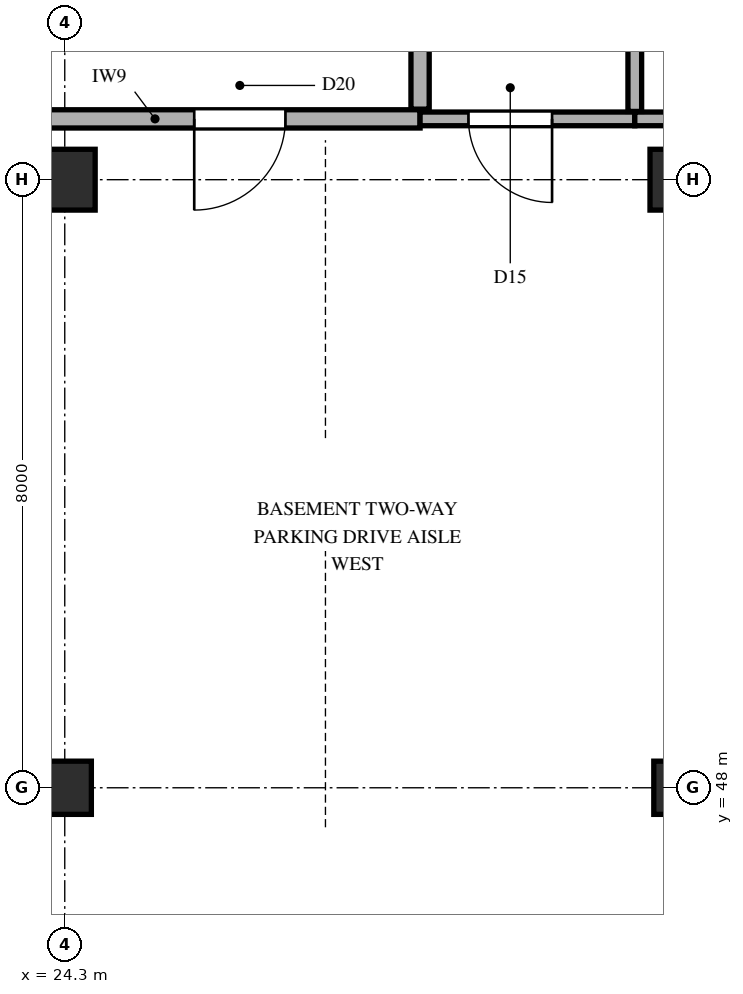
"""IFC4 building model, lengths in metres.
Left out: names, types, materials, properties, quantities, classifications, styles, units other than length and angle.
Written with IfcOpenShell. Run it as: python <this file> out.ifc"""

import sys

from ifc_helpers import new_model, si_unit, direction, frame, frame_2d, origin, origin_2d, place, context, subcontext, project, spatial, rectangle, extrude, element, fill, save


model = new_model("IFC4")
c1 = context("Model", 3, precision=1e-05, world=origin(), true_north=direction((0.0, 1.0)))
c2 = subcontext(c1, "Body", "Model", "MODEL_VIEW")
j1 = project(units=[si_unit("LENGTHUNIT", "METRE"), si_unit("PLANEANGLEUNIT", "RADIAN")], contexts=[c1])
p1 = place(None, origin())
s1 = spatial("IfcSite", under=j1, at=p1, CompositionType="ELEMENT")
p2 = place(p1, origin())
s2 = spatial("IfcBuilding", under=s1, at=p2, CompositionType="ELEMENT")
p3 = place(p2, frame((0.0, 0.0, -4.8)))
s3 = spatial("IfcBuildingStorey", under=s2, at=p3, CompositionType="ELEMENT", Elevation=-4.8)
p4 = place(p3, frame((24.3, 48.0, 0.0), z_axis=(0.0, 0.0, 1.0), x_axis=(1.0, 0.0, 0.0)))
e1 = element("IfcColumn", 1, at=p4, inside=s3, PredefinedType="COLUMN", context=c2, shape_type="SweptSolid", body=[
    extrude(rectangle(XDim=0.7, YDim=0.7, at=origin_2d()), origin(), (0.0, 0.0, 1.0), 4.8),
])
p5 = place(p3, frame((24.3, 56.0, 0.0), z_axis=(0.0, 0.0, 1.0), x_axis=(1.0, 0.0, 0.0)))
e2 = element("IfcColumn", 2, at=p5, inside=s3, PredefinedType="COLUMN", context=c2, shape_type="SweptSolid", body=[
    extrude(rectangle(XDim=0.8, YDim=0.8, at=origin_2d()), origin(), (0.0, 0.0, 1.0), 4.8),
])
p6 = place(p3, frame((32.4, 48.0, 0.0), z_axis=(0.0, 0.0, 1.0), x_axis=(1.0, 0.0, 0.0)))
e3 = element("IfcColumn", 3, at=p6, inside=s3, PredefinedType="COLUMN", context=c2, shape_type="SweptSolid", body=[
    extrude(rectangle(XDim=0.7, YDim=0.7, at=origin_2d()), origin(), (0.0, 0.0, 1.0), 4.8),
])
p7 = place(p3, frame((32.4, 56.0, 0.0), z_axis=(0.0, 0.0, 1.0), x_axis=(1.0, 0.0, 0.0)))
e4 = element("IfcColumn", 4, at=p7, inside=s3, PredefinedType="COLUMN", context=c2, shape_type="SweptSolid", body=[
    extrude(rectangle(XDim=0.8, YDim=0.8, at=origin_2d()), origin(), (0.0, 0.0, 1.0), 4.8),
])
p8 = place(p3, frame((22.0, 56.8, 0.0), z_axis=(0.0, 0.0, 1.0), x_axis=(1.0, 0.0, 0.0)))
e5 = element("IfcWall", 5, at=p8, inside=s3, PredefinedType="PARTITIONING", context=c2, shape_type="SweptSolid", body=[
    extrude(rectangle(XDim=6.975, YDim=0.24, at=frame_2d((3.488, 0.0))), origin(), (0.0, 0.0, 1.0), 4.45),
])
p9 = place(p8, frame((4.003, 0.0, 0.0)))
e6 = element("IfcOpeningElement", 6, at=p9, cuts=e5, PredefinedType="OPENING", context=c2, shape_type="SweptSolid", body=[
    extrude(rectangle(XDim=1.2, YDim=2.3, at=frame_2d((0.6, 1.15))), frame((0.0, 0.13, 0.0), z_axis=(0.0, -1.0, 0.0), x_axis=(1.0, 0.0, 0.0)), (0.0, 0.0, 1.0), 0.26),
])
p10 = place(p3, frame((28.975, 56.8, 0.0), z_axis=(0.0, 0.0, 1.0), x_axis=(1.0, 0.0, 0.0)))
e7 = element("IfcWall", 7, at=p10, inside=s3, PredefinedType="PARTITIONING", context=c2, shape_type="SweptSolid", body=[
    extrude(rectangle(XDim=2.825, YDim=0.18, at=frame_2d((1.413, 0.0))), origin(), (0.0, 0.0, 1.0), 4.45),
])
p11 = place(p10, frame((0.636, 0.0, 0.0)))
e8 = element("IfcOpeningElement", 8, at=p11, cuts=e7, PredefinedType="OPENING", context=c2, shape_type="SweptSolid", body=[
    extrude(rectangle(XDim=1.1, YDim=2.2, at=frame_2d((0.55, 1.1))), frame((0.0, 0.1, 0.0), z_axis=(0.0, -1.0, 0.0), x_axis=(1.0, 0.0, 0.0)), (0.0, 0.0, 1.0), 0.2),
])
p12 = place(p3, frame((31.8, 56.8, 0.0), z_axis=(0.0, 0.0, 1.0), x_axis=(1.0, 0.0, 0.0)))
e9 = element("IfcWall", 9, at=p12, inside=s3, PredefinedType="PARTITIONING", context=c2, shape_type="SweptSolid", body=[
    extrude(rectangle(XDim=4.4, YDim=0.18, at=frame_2d((2.2, 0.0))), origin(), (0.0, 0.0, 1.0), 4.45),
])
p13 = place(p3, frame((28.975, 56.928, 0.0), z_axis=(0.0, 0.0, 1.0), x_axis=(0.0, 1.0, 0.0)))
e10 = element("IfcWall", 10, at=p13, inside=s3, PredefinedType="PARTITIONING", context=c2, shape_type="SweptSolid", body=[
    extrude(rectangle(XDim=3.164, YDim=0.24, at=frame_2d((1.582, 0.0))), origin(), (0.0, 0.0, 1.0), 4.45),
])
p14 = place(p3, frame((31.8, 56.898, 0.0), z_axis=(0.0, 0.0, 1.0), x_axis=(0.0, 1.0, 0.0)))
e11 = element("IfcWall", 11, at=p14, inside=s3, PredefinedType="PARTITIONING", context=c2, shape_type="SweptSolid", body=[
    extrude(rectangle(XDim=3.194, YDim=0.18, at=frame_2d((1.597, 0.0))), origin(), (0.0, 0.0, 1.0), 4.45),
])
p15 = place(p9, frame((1.2, 0.0, 0.0), z_axis=(0.0, 0.0, 1.0), x_axis=(-1.0, 0.0, 0.0)))
e12 = element("IfcDoor", 12, at=p15, inside=s3, OperationType="SINGLE_SWING_LEFT", PredefinedType="DOOR", context=c2, shape_type="SweptSolid", body=[
    extrude(rectangle(XDim=1.2, YDim=2.3, at=frame_2d((0.6, 1.15))), frame((0.0, 0.025, 0.0), z_axis=(0.0, -1.0, 0.0), x_axis=(1.0, 0.0, 0.0)), (0.0, 0.0, 1.0), 0.05),
])
fill(e6, e12)
p16 = place(p11, frame((1.1, 0.0, 0.0), z_axis=(0.0, 0.0, 1.0), x_axis=(-1.0, 0.0, 0.0)))
e13 = element("IfcDoor", 13, at=p16, inside=s3, OperationType="SINGLE_SWING_RIGHT", PredefinedType="DOOR", context=c2, shape_type="SweptSolid", body=[
    extrude(rectangle(XDim=1.1, YDim=2.2, at=frame_2d((0.55, 1.1))), frame((0.0, 0.025, 0.0), z_axis=(0.0, -1.0, 0.0), x_axis=(1.0, 0.0, 0.0)), (0.0, 0.0, 1.0), 0.05),
])
fill(e8, e13)
save(model, sys.argv[1])
